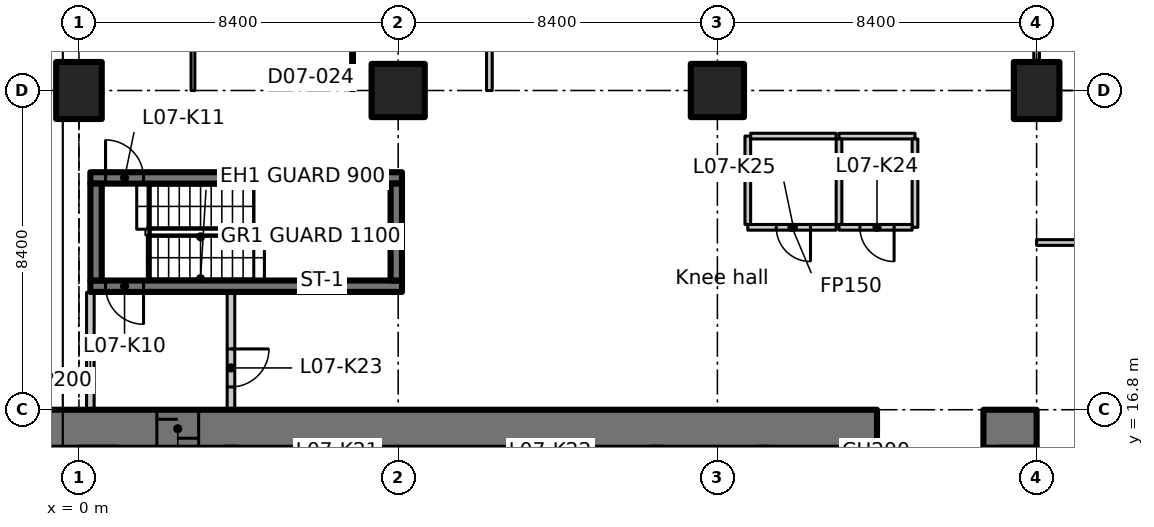
"""IFC4 building model, lengths in metres.
Left out: names, types, materials, properties, quantities, classifications, styles, units other than length and angle.
Written with IfcOpenShell. Run it as: python <this file> out.ifc"""

import sys

from ifc_helpers import new_model, si_unit, direction, frame, frame_2d, origin, origin_2d, place, context, subcontext, project, spatial, polyline, rectangle, outline, extrude, element, fill, save


model = new_model("IFC4")
c1 = context("Model", 3, precision=1e-05, world=origin(), true_north=direction((0.0, 1.0)))
c2 = subcontext(c1, "Body", "Model", "MODEL_VIEW")
j1 = project(units=[si_unit("LENGTHUNIT", "METRE"), si_unit("PLANEANGLEUNIT", "RADIAN")], contexts=[c1])
p1 = place(None, origin())
s1 = spatial("IfcSite", under=j1, at=p1, CompositionType="ELEMENT")
p2 = place(p1, origin())
s2 = spatial("IfcBuilding", under=s1, at=p2, CompositionType="ELEMENT")
p3 = place(p2, frame((0.0, 0.0, 40.1)))
s3 = spatial("IfcBuildingStorey", under=s2, at=p3, CompositionType="ELEMENT", Elevation=40.1)
p4 = place(p3, frame((0.0, 25.2, 0.0), z_axis=(0.0, 0.0, 1.0), x_axis=(1.0, 0.0, 0.0)))
e1 = element("IfcColumn", 1, at=p4, inside=s3, PredefinedType="COLUMN", context=c2, shape_type="SweptSolid", body=[
    extrude(rectangle(XDim=1.2, YDim=1.5, at=origin_2d()), origin(), (0.0, 0.0, 1.0), 3.35),
])
for number, where, z_axis, x_axis in (
    (2, (8.4, 25.2, 0.0), (0.0, 0.0, 1.0), (1.0, 0.0, 0.0)),
    (3, (16.8, 25.2, 0.0), (0.0, 0.0, 1.0), (1.0, 0.0, 0.0)),
):
    element("IfcColumn", number, at=place(p3, frame(where, z_axis=z_axis, x_axis=x_axis)), inside=s3, PredefinedType="COLUMN", context=c2, shape_type="SweptSolid", body=[
        extrude(rectangle(XDim=1.4, YDim=1.4, at=origin_2d()), origin(), (0.0, 0.0, 1.0), 3.35),
    ])
p5 = place(p3, frame((25.2, 25.2, 0.0), z_axis=(0.0, 0.0, 1.0), x_axis=(1.0, 0.0, 0.0)))
e4 = element("IfcColumn", 4, at=p5, inside=s3, PredefinedType="COLUMN", context=c2, shape_type="SweptSolid", body=[
    extrude(rectangle(XDim=1.2, YDim=1.5, at=origin_2d()), origin(), (0.0, 0.0, 1.0), 3.35),
])
p6 = place(p3, frame((-1.1, 16.3, 0.0), z_axis=(0.0, 0.0, 1.0), x_axis=(1.0, 0.0, 0.0)))
e5 = element("IfcWall", 5, at=p6, inside=s3, PredefinedType="SHEAR", context=c2, shape_type="SweptSolid", body=[
    extrude(rectangle(XDim=22.1, YDim=1.0, at=frame_2d((11.05, 0.0))), origin(), (0.0, 0.0, 1.0), 3.35),
])
p7 = place(p6, frame((3.15, 0.0, 0.0)))
e6 = element("IfcOpeningElement", 6, at=p7, cuts=e5, PredefinedType="OPENING", context=c2, shape_type="SweptSolid", body=[
    extrude(rectangle(XDim=1.1, YDim=2.3, at=frame_2d((0.55, 1.15))), frame((0.0, 0.51, 0.0), z_axis=(0.0, -1.0, 0.0), x_axis=(1.0, 0.0, 0.0)), (0.0, 0.0, 1.0), 1.02),
])
p8 = place(p3, frame((23.8, 16.3, 0.0), z_axis=(0.0, 0.0, 1.0), x_axis=(1.0, 0.0, 0.0)))
e7 = element("IfcWall", 7, at=p8, inside=s3, PredefinedType="SHEAR", context=c2, shape_type="SweptSolid", body=[
    extrude(rectangle(XDim=1.4, YDim=1.0, at=frame_2d((0.7, 0.0))), origin(), (0.0, 0.0, 1.0), 3.35),
])
p9 = place(p3, frame((24.7, 12.6, 0.0), z_axis=(0.0, 0.0, 1.0), x_axis=(0.0, 1.0, 0.0)))
e8 = element("IfcWall", 8, at=p9, inside=s3, PredefinedType="SHEAR", context=c2, shape_type="SweptSolid", body=[
    extrude(rectangle(XDim=3.2, YDim=1.0, at=frame_2d((1.6, 0.0))), origin(), (0.0, 0.0, 1.0), 3.35),
])
p10 = place(p3, frame((8.5, 20.05, 0.0), z_axis=(0.0, 0.0, 1.0), x_axis=(-1.0, 0.0, 0.0)))
e9 = element("IfcWall", 9, at=p10, inside=s3, PredefinedType="SHEAR", context=c2, shape_type="SweptSolid", body=[
    extrude(rectangle(XDim=8.2, YDim=0.3, at=frame_2d((4.1, 0.0))), origin(), (0.0, 0.0, 1.0), 3.35),
])
p11 = place(p10, frame((6.8, 0.0, 0.0)))
e10 = element("IfcOpeningElement", 10, at=p11, cuts=e9, PredefinedType="OPENING", context=c2, shape_type="SweptSolid", body=[
    extrude(rectangle(XDim=1.0, YDim=2.1, at=frame_2d((0.5, 1.05))), frame((0.0, 0.16, 0.0), z_axis=(0.0, -1.0, 0.0), x_axis=(1.0, 0.0, 0.0)), (0.0, 0.0, 1.0), 0.32),
])
p12 = place(p3, frame((0.3, 22.9, 0.0), z_axis=(0.0, 0.0, 1.0), x_axis=(1.0, 0.0, 0.0)))
e11 = element("IfcWall", 11, at=p12, inside=s3, PredefinedType="SHEAR", context=c2, shape_type="SweptSolid", body=[
    extrude(rectangle(XDim=8.2, YDim=0.3, at=frame_2d((4.1, 0.0))), origin(), (0.0, 0.0, 1.0), 3.35),
])
p13 = place(p12, frame((0.4, 0.0, 0.0)))
e12 = element("IfcOpeningElement", 12, at=p13, cuts=e11, PredefinedType="OPENING", context=c2, shape_type="SweptSolid", body=[
    extrude(rectangle(XDim=1.0, YDim=2.1, at=frame_2d((0.5, 1.05))), frame((0.0, 0.16, 0.0), z_axis=(0.0, -1.0, 0.0), x_axis=(1.0, 0.0, 0.0)), (0.0, 0.0, 1.0), 0.32),
])
for number, where, z_axis, x_axis in (
    (13, (0.45, 20.2, 0.0), (0.0, 0.0, 1.0), (0.0, 1.0, 0.0)),
    (14, (8.35, 20.2, 0.0), (0.0, 0.0, 1.0), (0.0, 1.0, 0.0)),
):
    element("IfcWall", number, at=place(p3, frame(where, z_axis=z_axis, x_axis=x_axis)), inside=s3, PredefinedType="SHEAR", context=c2, shape_type="SweptSolid", body=[
        extrude(rectangle(XDim=2.55, YDim=0.3, at=frame_2d((1.275, 0.0))), origin(), (0.0, 0.0, 1.0), 3.35),
    ])
p14 = place(p3, frame((0.3, 16.812, 0.0), z_axis=(0.0, 0.0, 1.0), x_axis=(0.0, 1.0, 0.0)))
e15 = element("IfcWall", 15, at=p14, inside=s3, PredefinedType="PARTITIONING", context=c2, shape_type="SweptSolid", body=[
    extrude(rectangle(XDim=3.076, YDim=0.2, at=frame_2d((1.538, 0.0))), origin(), (0.0, 0.0, 1.0), 2.98),
])
p15 = place(p3, frame((4.0, 19.888, 0.0), z_axis=(0.0, 0.0, 1.0), x_axis=(0.0, -1.0, 0.0)))
e16 = element("IfcWall", 16, at=p15, inside=s3, PredefinedType="PARTITIONING", context=c2, shape_type="SweptSolid", body=[
    extrude(rectangle(XDim=3.076, YDim=0.2, at=frame_2d((1.538, 0.0))), origin(), (0.0, 0.0, 1.0), 3.35),
])
p16 = place(p15, frame((1.488, 0.0, 0.0)))
e17 = element("IfcOpeningElement", 17, at=p16, cuts=e16, PredefinedType="OPENING", context=c2, shape_type="SweptSolid", body=[
    extrude(rectangle(XDim=1.0, YDim=2.1, at=frame_2d((0.5, 1.05))), frame((0.0, 0.11, 0.0), z_axis=(0.0, -1.0, 0.0), x_axis=(1.0, 0.0, 0.0)), (0.0, 0.0, 1.0), 0.22),
])
p17 = place(p3, frame((20.0, 24.0, 0.0), z_axis=(0.0, 0.0, 1.0), x_axis=(1.0, 0.0, 0.0)))
e18 = element("IfcWall", 18, at=p17, inside=s3, PredefinedType="PARTITIONING", context=c2, shape_type="SweptSolid", body=[
    extrude(rectangle(XDim=2.0, YDim=0.15, at=frame_2d((1.0, 0.0))), origin(), (0.0, 0.0, 1.0), 3.35),
])
p18 = place(p3, frame((22.0, 23.925, 0.0), z_axis=(0.0, 0.0, 1.0), x_axis=(0.0, -1.0, 0.0)))
e19 = element("IfcWall", 19, at=p18, inside=s3, PredefinedType="PARTITIONING", context=c2, shape_type="SweptSolid", body=[
    extrude(rectangle(XDim=2.325, YDim=0.15, at=frame_2d((1.163, 0.0))), origin(), (0.0, 0.0, 1.0), 3.35),
])
p19 = place(p3, frame((21.925, 21.6, 0.0), z_axis=(0.0, 0.0, 1.0), x_axis=(-1.0, 0.0, 0.0)))
e20 = element("IfcWall", 20, at=p19, inside=s3, PredefinedType="PARTITIONING", context=c2, shape_type="SweptSolid", body=[
    extrude(rectangle(XDim=1.925, YDim=0.15, at=frame_2d((0.962, 0.0))), origin(), (0.0, 0.0, 1.0), 3.35),
])
p20 = place(p19, frame((0.475, 0.0, 0.0)))
e21 = element("IfcOpeningElement", 21, at=p20, cuts=e20, PredefinedType="OPENING", context=c2, shape_type="SweptSolid", body=[
    extrude(rectangle(XDim=0.9, YDim=2.1, at=frame_2d((0.45, 1.05))), frame((0.0, 0.085, 0.0), z_axis=(0.0, -1.0, 0.0), x_axis=(1.0, 0.0, 0.0)), (0.0, 0.0, 1.0), 0.17),
])
p21 = place(p3, frame((20.0, 21.675, 0.0), z_axis=(0.0, 0.0, 1.0), x_axis=(0.0, 1.0, 0.0)))
e22 = element("IfcWall", 22, at=p21, inside=s3, PredefinedType="PARTITIONING", context=c2, shape_type="SweptSolid", body=[
    extrude(rectangle(XDim=2.25, YDim=0.15, at=frame_2d((1.125, 0.0))), origin(), (0.0, 0.0, 1.0), 3.35),
])
p22 = place(p3, frame((19.925, 21.6, 0.0), z_axis=(0.0, 0.0, 1.0), x_axis=(-1.0, 0.0, 0.0)))
e23 = element("IfcWall", 23, at=p22, inside=s3, PredefinedType="PARTITIONING", context=c2, shape_type="SweptSolid", body=[
    extrude(rectangle(XDim=2.325, YDim=0.15, at=frame_2d((1.163, 0.0))), origin(), (0.0, 0.0, 1.0), 3.35),
])
p23 = place(p22, frame((0.675, 0.0, 0.0)))
e24 = element("IfcOpeningElement", 24, at=p23, cuts=e23, PredefinedType="OPENING", context=c2, shape_type="SweptSolid", body=[
    extrude(rectangle(XDim=0.9, YDim=2.1, at=frame_2d((0.45, 1.05))), frame((0.0, 0.085, 0.0), z_axis=(0.0, -1.0, 0.0), x_axis=(1.0, 0.0, 0.0)), (0.0, 0.0, 1.0), 0.17),
])
p24 = place(p3, frame((17.6, 21.675, 0.0), z_axis=(0.0, 0.0, 1.0), x_axis=(0.0, 1.0, 0.0)))
e25 = element("IfcWall", 25, at=p24, inside=s3, PredefinedType="PARTITIONING", context=c2, shape_type="SweptSolid", body=[
    extrude(rectangle(XDim=2.325, YDim=0.15, at=frame_2d((1.163, 0.0))), origin(), (0.0, 0.0, 1.0), 3.35),
])
p25 = place(p3, frame((17.675, 24.0, 0.0), z_axis=(0.0, 0.0, 1.0), x_axis=(1.0, 0.0, 0.0)))
e26 = element("IfcWall", 26, at=p25, inside=s3, PredefinedType="PARTITIONING", context=c2, shape_type="SweptSolid", body=[
    extrude(rectangle(XDim=2.25, YDim=0.15, at=frame_2d((1.125, 0.0))), origin(), (0.0, 0.0, 1.0), 3.35),
])
p26 = place(p3, frame((25.2, 21.2, 0.0), z_axis=(0.0, 0.0, 1.0), x_axis=(1.0, 0.0, 0.0)))
e27 = element("IfcWall", 27, at=p26, inside=s3, PredefinedType="PARTITIONING", context=c2, shape_type="SweptSolid", body=[
    extrude(rectangle(XDim=4.2, YDim=0.15, at=frame_2d((2.1, 0.0))), origin(), (0.0, 0.0, 1.0), 3.33),
])
p27 = place(p3, frame((25.2, 31.0, 0.0), z_axis=(0.0, 0.0, 1.0), x_axis=(0.0, -1.0, 0.0)))
e28 = element("IfcWall", 28, at=p27, inside=s3, PredefinedType="PARTITIONING", context=c2, shape_type="SweptSolid", body=[
    extrude(outline(polyline([(0.0, 0.0), (5.03, 0.0), (5.03, 2.98), (0.0, 2.98), (0.0, 0.0)])), frame((0.0, 0.075, 0.0), z_axis=(0.0, -1.0, 0.0), x_axis=(1.0, 0.0, 0.0)), (0.0, 0.0, 1.0), 0.15),
])
p28 = place(p27, frame((1.83, 0.0, 0.0)))
e29 = element("IfcOpeningElement", 29, at=p28, cuts=e28, PredefinedType="OPENING", context=c2, shape_type="SweptSolid", body=[
    extrude(rectangle(XDim=1.1, YDim=2.1, at=frame_2d((0.55, 1.05))), frame((0.0, 0.085, 0.0), z_axis=(0.0, -1.0, 0.0), x_axis=(1.0, 0.0, 0.0)), (0.0, 0.0, 1.0), 0.17),
])
p29 = place(p3, frame((10.8, 25.2, 0.0), z_axis=(0.0, 0.0, 1.0), x_axis=(0.0, 1.0, 0.0)))
e30 = element("IfcWall", 30, at=p29, inside=s3, PredefinedType="PARTITIONING", context=c2, shape_type="SweptSolid", body=[
    extrude(rectangle(XDim=4.2, YDim=0.15, at=frame_2d((2.1, 0.0))), origin(), (0.0, 0.0, 1.0), 3.33),
])
p30 = place(p3, frame((3.0, 29.4, 0.0), z_axis=(0.0, 0.0, 1.0), x_axis=(0.0, -1.0, 0.0)))
e31 = element("IfcWall", 31, at=p30, inside=s3, PredefinedType="PARTITIONING", context=c2, shape_type="SweptSolid", body=[
    extrude(rectangle(XDim=4.2, YDim=0.1, at=frame_2d((2.1, 0.0))), origin(), (0.0, 0.0, 1.0), 3.33),
])
p31 = place(p3, frame((7.2, 29.4, 0.0), z_axis=(0.0, 0.0, 1.0), x_axis=(0.0, -1.0, 0.0)))
e32 = element("IfcWall", 32, at=p31, inside=s3, PredefinedType="PARTITIONING", context=c2, shape_type="SweptSolid", body=[
    extrude(rectangle(XDim=4.2, YDim=0.1, at=frame_2d((2.1, 0.0))), origin(), (0.0, 0.0, 1.0), 3.33),
])
p32 = place(p31, frame((1.5, 0.0, 0.0)))
e33 = element("IfcOpeningElement", 33, at=p32, cuts=e32, PredefinedType="OPENING", context=c2, shape_type="SweptSolid", body=[
    extrude(rectangle(XDim=0.9, YDim=2.1, at=frame_2d((0.45, 1.05))), frame((0.0, 0.06, 0.0), z_axis=(0.0, -1.0, 0.0), x_axis=(1.0, 0.0, 0.0)), (0.0, 0.0, 1.0), 0.12),
])
p33 = place(p7, origin())
e34 = element("IfcDoor", 34, at=p33, inside=s3, OperationType="SLIDING_TO_LEFT", PredefinedType="DOOR", context=c2, shape_type="SweptSolid", body=[
    extrude(rectangle(XDim=1.1, YDim=2.3, at=frame_2d((0.55, 1.15))), frame((0.0, 0.025, 0.0), z_axis=(0.0, -1.0, 0.0), x_axis=(1.0, 0.0, 0.0)), (0.0, 0.0, 1.0), 0.05),
])
fill(e6, e34)
p34 = place(p11, origin())
e35 = element("IfcDoor", 35, at=p34, inside=s3, OperationType="SINGLE_SWING_RIGHT", PredefinedType="DOOR", context=c2, shape_type="SweptSolid", body=[
    extrude(rectangle(XDim=1.0, YDim=2.1, at=frame_2d((0.5, 1.05))), frame((0.0, 0.025, 0.0), z_axis=(0.0, -1.0, 0.0), x_axis=(1.0, 0.0, 0.0)), (0.0, 0.0, 1.0), 0.05),
])
fill(e10, e35)
p35 = place(p13, origin())
e36 = element("IfcDoor", 36, at=p35, inside=s3, OperationType="SINGLE_SWING_LEFT", PredefinedType="DOOR", context=c2, shape_type="SweptSolid", body=[
    extrude(rectangle(XDim=1.0, YDim=2.1, at=frame_2d((0.5, 1.05))), frame((0.0, 0.025, 0.0), z_axis=(0.0, -1.0, 0.0), x_axis=(1.0, 0.0, 0.0)), (0.0, 0.0, 1.0), 0.05),
])
fill(e12, e36)
p36 = place(p16, origin())
e37 = element("IfcDoor", 37, at=p36, inside=s3, OperationType="SINGLE_SWING_LEFT", PredefinedType="DOOR", context=c2, shape_type="SweptSolid", body=[
    extrude(rectangle(XDim=1.0, YDim=2.1, at=frame_2d((0.5, 1.05))), frame((0.0, 0.025, 0.0), z_axis=(0.0, -1.0, 0.0), x_axis=(1.0, 0.0, 0.0)), (0.0, 0.0, 1.0), 0.05),
])
fill(e17, e37)
p37 = place(p20, origin())
e38 = element("IfcDoor", 38, at=p37, inside=s3, OperationType="SINGLE_SWING_RIGHT", PredefinedType="DOOR", context=c2, shape_type="SweptSolid", body=[
    extrude(rectangle(XDim=0.9, YDim=2.1, at=frame_2d((0.45, 1.05))), frame((0.0, 0.025, 0.0), z_axis=(0.0, -1.0, 0.0), x_axis=(1.0, 0.0, 0.0)), (0.0, 0.0, 1.0), 0.05),
])
fill(e21, e38)
p38 = place(p23, origin())
e39 = element("IfcDoor", 39, at=p38, inside=s3, OperationType="SINGLE_SWING_LEFT", PredefinedType="DOOR", context=c2, shape_type="SweptSolid", body=[
    extrude(rectangle(XDim=0.9, YDim=2.1, at=frame_2d((0.45, 1.05))), frame((0.0, 0.025, 0.0), z_axis=(0.0, -1.0, 0.0), x_axis=(1.0, 0.0, 0.0)), (0.0, 0.0, 1.0), 0.05),
])
fill(e24, e39)
save(model, sys.argv[1])
